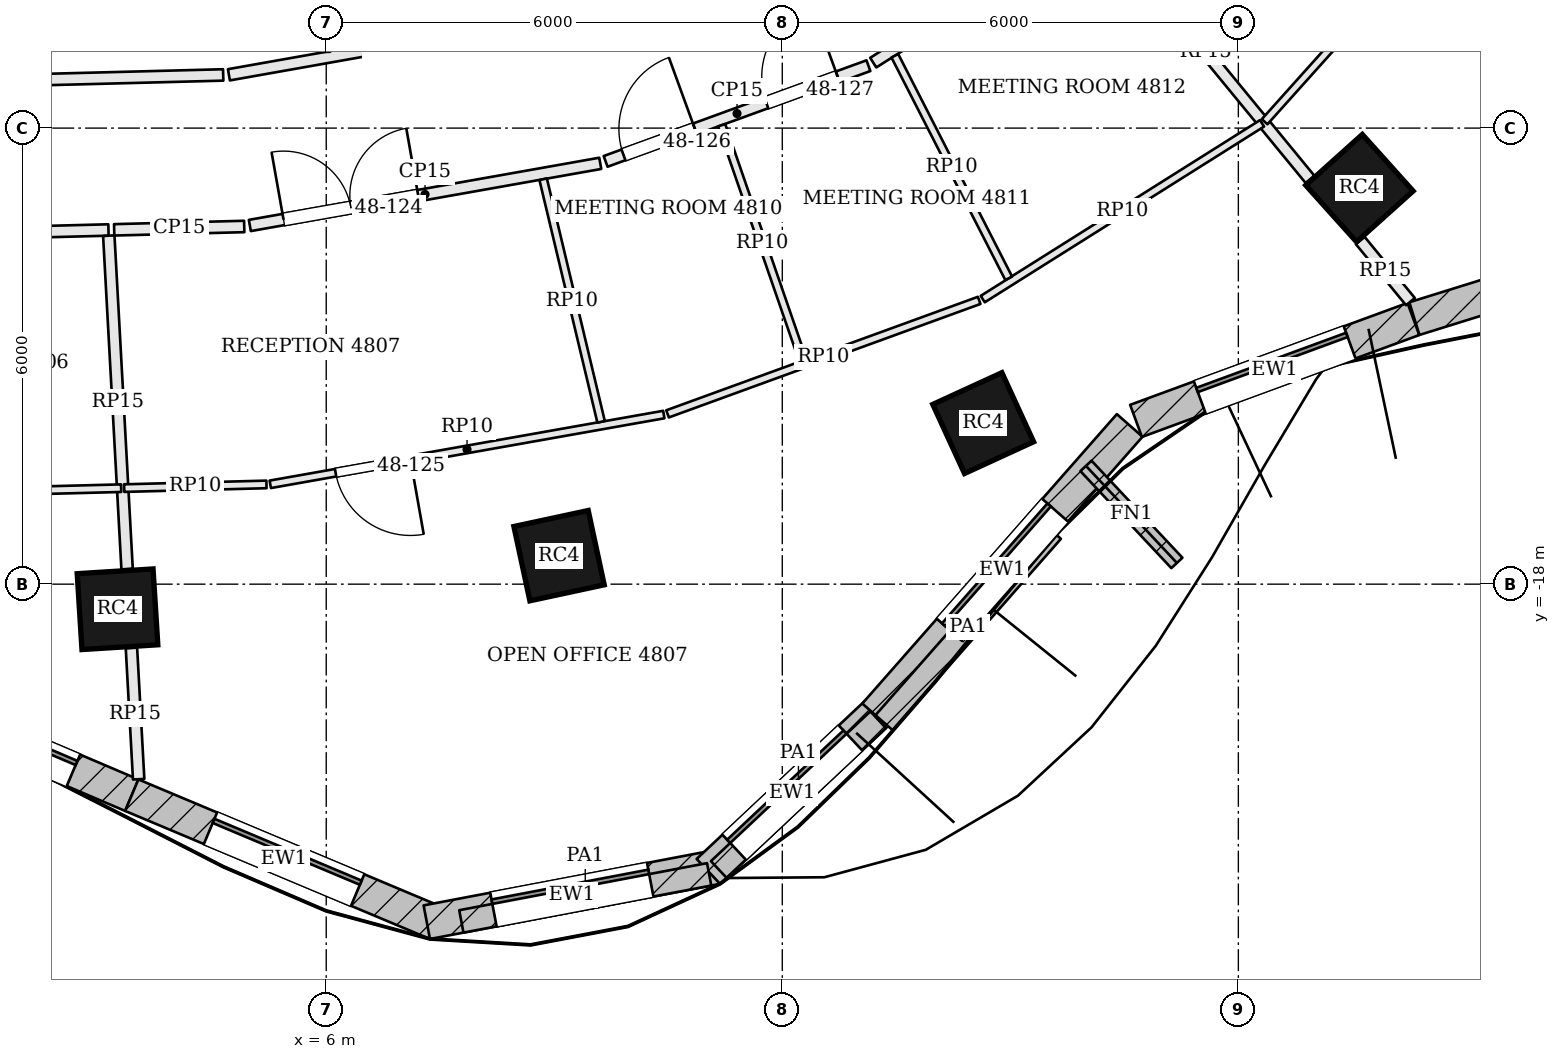
"""IFC4 building model, lengths in metres.
Left out: names, types, materials, properties, quantities, classifications, styles, units other than length and angle.
Written with IfcOpenShell. Run it as: python <this file> out.ifc"""

import sys

from ifc_helpers import new_model, si_unit, direction, frame, frame_2d, origin, origin_2d, place, context, subcontext, project, spatial, rectangle, extrude, element, fill, save


model = new_model("IFC4")
c1 = context("Model", 3, precision=1e-05, world=origin(), true_north=direction((0.0, 1.0)))
c2 = subcontext(c1, "Body", "Model", "MODEL_VIEW")
j1 = project(units=[si_unit("LENGTHUNIT", "METRE"), si_unit("PLANEANGLEUNIT", "RADIAN")], contexts=[c1])
p1 = place(None, origin())
s1 = spatial("IfcSite", under=j1, at=p1, CompositionType="ELEMENT")
p2 = place(p1, origin())
s2 = spatial("IfcBuilding", under=s1, at=p2, CompositionType="ELEMENT")
p3 = place(p2, frame((0.0, 0.0, 197.4)))
s3 = spatial("IfcBuildingStorey", under=s2, at=p3, CompositionType="ELEMENT", Elevation=197.4)
for number, where, z_axis, x_axis in (
    (1, (3.254, -18.33, 0.0), (0.0, 0.0, 1.0), (0.998, 0.063, 0.0)),
    (2, (9.063, -17.625, 0.0), (0.0, 0.0, 1.0), (0.978, 0.21, 0.0)),
    (3, (14.643, -15.881, 0.0), (0.0, 0.0, 1.0), (0.909, 0.417, 0.0)),
    (4, (19.593, -12.79, 0.0), (0.0, 0.0, 1.0), (0.744, 0.668, 0.0)),
):
    element("IfcColumn", number, at=place(p3, frame(where, z_axis=z_axis, x_axis=x_axis)), inside=s3, PredefinedType="COLUMN", context=c2, shape_type="SweptSolid", body=[
        extrude(rectangle(XDim=1.0, YDim=1.0, at=origin_2d()), origin(), (0.0, 0.0, 1.0), 3.9),
    ])
p4 = place(p3, frame((-0.026, -19.299, 0.0), z_axis=(0.0, 0.0, 1.0), x_axis=(0.920040408927, -0.391823488245, 0.0)))
e5 = element("IfcWall", 5, at=p4, inside=s3, PredefinedType="SOLIDWALL", context=c2, shape_type="SweptSolid", body=[
    extrude(rectangle(XDim=3.77, YDim=0.45, at=frame_2d((1.885, 0.0))), origin(), (0.0, 0.0, 1.0), 3.7),
])
p5 = place(p4, frame((0.835, 0.0, 0.9)))
e6 = element("IfcOpeningElement", 6, at=p5, cuts=e5, PredefinedType="OPENING", context=c2, shape_type="SweptSolid", body=[
    extrude(rectangle(XDim=2.1, YDim=2.3, at=frame_2d((1.05, 1.15))), frame((0.0, 0.235, 0.0), z_axis=(0.0, -1.0, 0.0), x_axis=(1.0, 0.0, 0.0)), (0.0, 0.0, 1.0), 0.47),
])
p6 = place(p3, frame((3.441, -20.776, 0.0), z_axis=(0.0, 0.0, 1.0), x_axis=(0.921988121387, -0.387218160758, 0.0)))
e7 = element("IfcWall", 7, at=p6, inside=s3, PredefinedType="SOLIDWALL", context=c2, shape_type="SweptSolid", body=[
    extrude(rectangle(XDim=4.347, YDim=0.45, at=frame_2d((2.173, 0.0))), origin(), (0.0, 0.0, 1.0), 3.7),
])
p7 = place(p6, frame((1.123, 0.0, 0.9)))
e8 = element("IfcOpeningElement", 8, at=p7, cuts=e7, PredefinedType="OPENING", context=c2, shape_type="SweptSolid", body=[
    extrude(rectangle(XDim=2.1, YDim=2.3, at=frame_2d((1.05, 1.15))), frame((0.0, 0.235, 0.0), z_axis=(0.0, -1.0, 0.0), x_axis=(1.0, 0.0, 0.0)), (0.0, 0.0, 1.0), 0.47),
])
p8 = place(p3, frame((7.323, -22.447, 0.0), z_axis=(0.0, 0.0, 1.0), x_axis=(0.982420993638, 0.18667884524, 0.0)))
e9 = element("IfcWall", 9, at=p8, inside=s3, PredefinedType="SOLIDWALL", context=c2, shape_type="SweptSolid", body=[
    extrude(rectangle(XDim=3.884, YDim=0.45, at=frame_2d((1.942, 0.0))), origin(), (0.0, 0.0, 1.0), 3.7),
])
p9 = place(p8, frame((0.892, 0.0, 0.9)))
e10 = element("IfcOpeningElement", 10, at=p9, cuts=e9, PredefinedType="OPENING", context=c2, shape_type="SweptSolid", body=[
    extrude(rectangle(XDim=2.1, YDim=2.3, at=frame_2d((1.05, 1.15))), frame((0.0, 0.235, 0.0), z_axis=(0.0, -1.0, 0.0), x_axis=(1.0, 0.0, 0.0)), (0.0, 0.0, 1.0), 0.47),
])
p10 = place(p3, frame((11.027, -21.779, 0.0), z_axis=(0.0, 0.0, 1.0), x_axis=(0.728871214251, 0.684650825631, 0.0)))
e11 = element("IfcWall", 11, at=p10, inside=s3, PredefinedType="SOLIDWALL", context=c2, shape_type="SweptSolid", body=[
    extrude(rectangle(XDim=3.031, YDim=0.45, at=frame_2d((1.516, 0.0))), origin(), (0.0, 0.0, 1.0), 3.7),
])
p11 = place(p10, frame((0.466, 0.0, 0.9)))
e12 = element("IfcOpeningElement", 12, at=p11, cuts=e11, PredefinedType="OPENING", context=c2, shape_type="SweptSolid", body=[
    extrude(rectangle(XDim=2.1, YDim=2.3, at=frame_2d((1.05, 1.15))), frame((0.0, 0.235, 0.0), z_axis=(0.0, -1.0, 0.0), x_axis=(1.0, 0.0, 0.0)), (0.0, 0.0, 1.0), 0.47),
])
p12 = place(p3, frame((13.221, -19.719, 0.0), z_axis=(0.0, 0.0, 1.0), x_axis=(0.660424908916, 0.750892095899, 0.0)))
e13 = element("IfcWall", 13, at=p12, inside=s3, PredefinedType="SOLIDWALL", context=c2, shape_type="SweptSolid", body=[
    extrude(rectangle(XDim=5.071, YDim=0.45, at=frame_2d((2.535, 0.0))), origin(), (0.0, 0.0, 1.0), 3.7),
])
p13 = place(p12, frame((1.485, 0.0, 0.9)))
e14 = element("IfcOpeningElement", 14, at=p13, cuts=e13, PredefinedType="OPENING", context=c2, shape_type="SweptSolid", body=[
    extrude(rectangle(XDim=2.1, YDim=2.3, at=frame_2d((1.05, 1.15))), frame((0.0, 0.235, 0.0), z_axis=(0.0, -1.0, 0.0), x_axis=(1.0, 0.0, 0.0)), (0.0, 0.0, 1.0), 0.47),
])
p14 = place(p3, frame((16.654, -15.852, 0.0), z_axis=(0.0, 0.0, 1.0), x_axis=(0.938636568132, 0.344907803572, 0.0)))
e15 = element("IfcWall", 15, at=p14, inside=s3, PredefinedType="SOLIDWALL", context=c2, shape_type="SweptSolid", body=[
    extrude(rectangle(XDim=3.887, YDim=0.45, at=frame_2d((1.944, 0.0))), origin(), (0.0, 0.0, 1.0), 3.7),
])
p15 = place(p14, frame((0.894, 0.0, 0.9)))
e16 = element("IfcOpeningElement", 16, at=p15, cuts=e15, PredefinedType="OPENING", context=c2, shape_type="SweptSolid", body=[
    extrude(rectangle(XDim=2.1, YDim=2.3, at=frame_2d((1.05, 1.15))), frame((0.0, 0.235, 0.0), z_axis=(0.0, -1.0, 0.0), x_axis=(1.0, 0.0, 0.0)), (0.0, 0.0, 1.0), 0.47),
])
p16 = place(p3, frame((20.316, -14.507, 0.0), z_axis=(0.0, 0.0, 1.0), x_axis=(0.954807195185, 0.297225873743, 0.0)))
e17 = element("IfcWall", 17, at=p16, inside=s3, PredefinedType="SOLIDWALL", context=c2, shape_type="SweptSolid", body=[
    extrude(rectangle(XDim=5.526, YDim=0.45, at=frame_2d((2.763, 0.0))), origin(), (0.0, 0.0, 1.0), 3.7),
])
p17 = place(p16, frame((1.713, 0.0, 0.9)))
e18 = element("IfcOpeningElement", 18, at=p17, cuts=e17, PredefinedType="OPENING", context=c2, shape_type="SweptSolid", body=[
    extrude(rectangle(XDim=2.1, YDim=2.3, at=frame_2d((1.05, 1.15))), frame((0.0, 0.235, 0.0), z_axis=(0.0, -1.0, 0.0), x_axis=(1.0, 0.0, 0.0)), (0.0, 0.0, 1.0), 0.47),
])
p18 = place(p3, frame((15.995, -16.444, 0.0), z_axis=(0.0, 0.0, 1.0), x_axis=(0.683852936488, -0.729619874494, 0.0)))
e19 = element("IfcWall", 19, at=p18, inside=s3, PredefinedType="SOLIDWALL", context=c2, shape_type="SweptSolid", body=[
    extrude(rectangle(XDim=1.75, YDim=0.2, at=frame_2d((0.875, 0.0))), origin(), (0.0, 0.0, 1.0), 3.7),
])
p19 = place(p3, frame((7.778, -22.437, 3.9), z_axis=(0.0, 0.0, 1.0), x_axis=(0.98241446716, 0.186713188382, 0.0)))
e20 = element("IfcWall", 20, at=p19, inside=s3, PredefinedType="PARAPET", context=c2, shape_type="SweptSolid", body=[
    extrude(rectangle(XDim=3.319, YDim=0.3, at=frame_2d((1.659, 0.0))), origin(), (0.0, 0.0, 1.0), 1.1),
])
p20 = place(p3, frame((11.164, -21.753, 3.9), z_axis=(0.0, 0.0, 1.0), x_axis=(0.72886475222, 0.684657704967, 0.0)))
e21 = element("IfcWall", 21, at=p20, inside=s3, PredefinedType="PARAPET", context=c2, shape_type="SweptSolid", body=[
    extrude(rectangle(XDim=2.877, YDim=0.3, at=frame_2d((1.438, 0.0))), origin(), (0.0, 0.0, 1.0), 1.1),
])
p21 = place(p3, frame((13.339, -19.822, 3.9), z_axis=(0.0, 0.0, 1.0), x_axis=(0.660445690116, 0.7508738179, 0.0)))
e22 = element("IfcWall", 22, at=p21, inside=s3, PredefinedType="PARAPET", context=c2, shape_type="SweptSolid", body=[
    extrude(rectangle(XDim=3.353, YDim=0.3, at=frame_2d((1.677, 0.0))), origin(), (0.0, 0.0, 1.0), 1.1),
])
p22 = place(p3, frame((-1.951, -13.472, 0.0), z_axis=(0.0, 0.0, 1.0), x_axis=(0.999664235233, 0.025911711565, 0.0)))
e23 = element("IfcWall", 23, at=p22, inside=s3, PredefinedType="PARTITIONING", context=c2, shape_type="SweptSolid", body=[
    extrude(rectangle(XDim=5.088, YDim=0.15, at=frame_2d((2.544, 0.0))), origin(), (0.0, 0.0, 1.0), 3.084),
])
p23 = place(p3, frame((3.532, -20.566, 0.0), z_axis=(0.0, 0.0, 1.0), x_axis=(-0.054930375168, 0.998490187175, 0.0)))
e24 = element("IfcWall", 24, at=p23, inside=s3, PredefinedType="PARTITIONING", context=c2, shape_type="SweptSolid", body=[
    extrude(rectangle(XDim=1.729, YDim=0.15, at=frame_2d((0.865, 0.0))), origin(), (0.0, 0.0, 1.0), 3.084),
])
p24 = place(p3, frame((3.38, -17.801, 0.0), z_axis=(0.0, 0.0, 1.0), x_axis=(-0.054860476936, 0.998494030062, 0.0)))
e25 = element("IfcWall", 25, at=p24, inside=s3, PredefinedType="PARTITIONING", context=c2, shape_type="SweptSolid", body=[
    extrude(rectangle(XDim=4.392, YDim=0.15, at=frame_2d((2.196, 0.0))), origin(), (0.0, 0.0, 1.0), 3.084),
])
p25 = place(p3, frame((3.21, -13.339, 0.0), z_axis=(0.0, 0.0, 1.0), x_axis=(0.999662941738, 0.025961566124, 0.0)))
e26 = element("IfcWall", 26, at=p25, inside=s3, PredefinedType="PARTITIONING", context=c2, shape_type="SweptSolid", body=[
    extrude(rectangle(XDim=1.711, YDim=0.15, at=frame_2d((0.856, 0.0))), origin(), (0.0, 0.0, 1.0), 3.084),
])
p26 = place(p3, frame((4.995, -13.281, 0.0), z_axis=(0.0, 0.0, 1.0), x_axis=(0.98463411377, 0.174630071865, 0.0)))
e27 = element("IfcWall", 27, at=p26, inside=s3, PredefinedType="PARTITIONING", context=c2, shape_type="SweptSolid", body=[
    extrude(rectangle(XDim=4.682, YDim=0.15, at=frame_2d((2.341, 0.0))), origin(), (0.0, 0.0, 1.0), 3.084),
])
p27 = place(p26, frame((0.45, 0.0, 0.0)))
e28 = element("IfcOpeningElement", 28, at=p27, cuts=e27, PredefinedType="OPENING", context=c2, shape_type="SweptSolid", body=[
    extrude(rectangle(XDim=1.8, YDim=2.1, at=frame_2d((0.9, 1.05))), frame((0.0, 0.085, 0.0), z_axis=(0.0, -1.0, 0.0), x_axis=(1.0, 0.0, 0.0)), (0.0, 0.0, 1.0), 0.17),
])
p28 = place(p3, frame((9.676, -12.438, 0.0), z_axis=(0.0, 0.0, 1.0), x_axis=(0.939640289748, 0.342163887461, 0.0)))
e29 = element("IfcWall", 29, at=p28, inside=s3, PredefinedType="PARTITIONING", context=c2, shape_type="SweptSolid", body=[
    extrude(rectangle(XDim=3.68, YDim=0.15, at=frame_2d((1.84, 0.0))), origin(), (0.0, 0.0, 1.0), 3.084),
])
p29 = place(p28, frame((0.25, 0.0, 0.0)))
e30 = element("IfcOpeningElement", 30, at=p29, cuts=e29, PredefinedType="OPENING", context=c2, shape_type="SweptSolid", body=[
    extrude(rectangle(XDim=1.0, YDim=2.4, at=frame_2d((0.5, 1.2))), frame((0.0, 0.085, 0.0), z_axis=(0.0, -1.0, 0.0), x_axis=(1.0, 0.0, 0.0)), (0.0, 0.0, 1.0), 0.17),
])
p30 = place(p28, frame((2.25, 0.0, 0.0)))
e31 = element("IfcOpeningElement", 31, at=p30, cuts=e29, PredefinedType="OPENING", context=c2, shape_type="SweptSolid", body=[
    extrude(rectangle(XDim=1.0, YDim=2.4, at=frame_2d((0.5, 1.2))), frame((0.0, 0.085, 0.0), z_axis=(0.0, -1.0, 0.0), x_axis=(1.0, 0.0, 0.0)), (0.0, 0.0, 1.0), 0.17),
])
p31 = place(p3, frame((13.197, -11.139, 0.0), z_axis=(0.0, 0.0, 1.0), x_axis=(0.845847451173, 0.533424867572, 0.0)))
e32 = element("IfcWall", 32, at=p31, inside=s3, PredefinedType="PARTITIONING", context=c2, shape_type="SweptSolid", body=[
    extrude(rectangle(XDim=3.493, YDim=0.15, at=frame_2d((1.747, 0.0))), origin(), (0.0, 0.0, 1.0), 3.084),
])
p32 = place(p31, frame((1.394, 0.0, 0.0)))
e33 = element("IfcOpeningElement", 33, at=p32, cuts=e32, PredefinedType="OPENING", context=c2, shape_type="SweptSolid", body=[
    extrude(rectangle(XDim=1.0, YDim=2.4, at=frame_2d((0.5, 1.2))), frame((0.0, 0.085, 0.0), z_axis=(0.0, -1.0, 0.0), x_axis=(1.0, 0.0, 0.0)), (0.0, 0.0, 1.0), 0.17),
])
p33 = place(p3, frame((20.264, -14.283, 0.0), z_axis=(0.0, 0.0, 1.0), x_axis=(-0.634834544887, 0.77264810918, 0.0)))
e34 = element("IfcWall", 34, at=p33, inside=s3, PredefinedType="PARTITIONING", context=c2, shape_type="SweptSolid", body=[
    extrude(rectangle(XDim=1.04, YDim=0.15, at=frame_2d((0.52, 0.0))), origin(), (0.0, 0.0, 1.0), 3.084),
])
p34 = place(p3, frame((18.943, -12.675, 0.0), z_axis=(0.0, 0.0, 1.0), x_axis=(-0.634730994321, 0.772733178301, 0.0)))
e35 = element("IfcWall", 35, at=p34, inside=s3, PredefinedType="PARTITIONING", context=c2, shape_type="SweptSolid", body=[
    extrude(rectangle(XDim=4.324, YDim=0.15, at=frame_2d((2.162, 0.0))), origin(), (0.0, 0.0, 1.0), 3.084),
])
p35 = place(p3, frame((9.01, -10.538, 0.0), z_axis=(0.0, 0.0, 1.0), x_axis=(-0.984645638575, -0.174565077936, 0.0)))
e36 = element("IfcWall", 36, at=p35, inside=s3, PredefinedType="PARTITIONING", context=c2, shape_type="SweptSolid", body=[
    extrude(rectangle(XDim=4.358, YDim=0.15, at=frame_2d((2.179, 0.0))), origin(), (0.0, 0.0, 1.0), 3.084),
])
p36 = place(p3, frame((4.645, -11.301, 0.0), z_axis=(0.0, 0.0, 1.0), x_axis=(-0.9996648469, -0.02588810291, 0.0)))
e37 = element("IfcWall", 37, at=p36, inside=s3, PredefinedType="PARTITIONING", context=c2, shape_type="SweptSolid", body=[
    extrude(rectangle(XDim=6.611, YDim=0.15, at=frame_2d((3.305, 0.0))), origin(), (0.0, 0.0, 1.0), 3.084),
])
p37 = place(p3, frame((3.302, -16.737, 0.0), z_axis=(0.0, 0.0, 1.0), x_axis=(-0.999665233763, -0.025873159948, 0.0)))
e38 = element("IfcWall", 38, at=p37, inside=s3, PredefinedType="PARTITIONING", context=c2, shape_type="SweptSolid", body=[
    extrude(rectangle(XDim=5.435, YDim=0.1, at=frame_2d((2.718, 0.0))), origin(), (0.0, 0.0, 1.0), 3.084),
])
p38 = place(p37, frame((1.454, 0.0, 0.0)))
e39 = element("IfcOpeningElement", 39, at=p38, cuts=e38, PredefinedType="OPENING", context=c2, shape_type="SweptSolid", body=[
    extrude(rectangle(XDim=0.9, YDim=2.1, at=frame_2d((0.45, 1.05))), frame((0.0, 0.06, 0.0), z_axis=(0.0, -1.0, 0.0), x_axis=(1.0, 0.0, 0.0)), (0.0, 0.0, 1.0), 0.12),
])
p39 = place(p3, frame((18.312, -11.938, 0.0), z_axis=(0.0, 0.0, 1.0), x_axis=(-0.846383069278, -0.532574595752, 0.0)))
e40 = element("IfcWall", 40, at=p39, inside=s3, PredefinedType="PARTITIONING", context=c2, shape_type="SweptSolid", body=[
    extrude(rectangle(XDim=4.341, YDim=0.1, at=frame_2d((2.171, 0.0))), origin(), (0.0, 0.0, 1.0), 3.084),
])
p40 = place(p3, frame((14.59, -14.267, 0.0), z_axis=(0.0, 0.0, 1.0), x_axis=(-0.939623405418, -0.342210251148, 0.0)))
e41 = element("IfcWall", 41, at=p40, inside=s3, PredefinedType="PARTITIONING", context=c2, shape_type="SweptSolid", body=[
    extrude(rectangle(XDim=4.363, YDim=0.1, at=frame_2d((2.182, 0.0))), origin(), (0.0, 0.0, 1.0), 3.084),
])
p41 = place(p3, frame((10.441, -15.769, 0.0), z_axis=(0.0, 0.0, 1.0), x_axis=(-0.984642067447, -0.174585219919, 0.0)))
e42 = element("IfcWall", 42, at=p41, inside=s3, PredefinedType="PARTITIONING", context=c2, shape_type="SweptSolid", body=[
    extrude(rectangle(XDim=5.258, YDim=0.1, at=frame_2d((2.629, 0.0))), origin(), (0.0, 0.0, 1.0), 3.084),
])
p42 = place(p41, frame((3.385, 0.0, 0.0)))
e43 = element("IfcOpeningElement", 43, at=p42, cuts=e42, PredefinedType="OPENING", context=c2, shape_type="SweptSolid", body=[
    extrude(rectangle(XDim=1.0, YDim=2.1, at=frame_2d((0.5, 1.05))), frame((0.0, 0.06, 0.0), z_axis=(0.0, -1.0, 0.0), x_axis=(1.0, 0.0, 0.0)), (0.0, 0.0, 1.0), 0.12),
])
p43 = place(p3, frame((5.214, -16.688, 0.0), z_axis=(0.0, 0.0, 1.0), x_axis=(-0.99966341664, -0.025943273332, 0.0)))
e44 = element("IfcWall", 44, at=p43, inside=s3, PredefinedType="PARTITIONING", context=c2, shape_type="SweptSolid", body=[
    extrude(rectangle(XDim=1.873, YDim=0.1, at=frame_2d((0.937, 0.0))), origin(), (0.0, 0.0, 1.0), 3.084),
])
p44 = place(p3, frame((8.854, -12.673, 0.0), z_axis=(0.0, 0.0, 1.0), x_axis=(0.23231460878, -0.972640695502, 0.0)))
e45 = element("IfcWall", 45, at=p44, inside=s3, PredefinedType="PARTITIONING", context=c2, shape_type="SweptSolid", body=[
    extrude(rectangle(XDim=3.281, YDim=0.1, at=frame_2d((1.641, 0.0))), origin(), (0.0, 0.0, 1.0), 3.084),
])
p45 = place(p3, frame((11.201, -11.962, 0.0), z_axis=(0.0, 0.0, 1.0), x_axis=(0.32685198031, -0.945075543524, 0.0)))
e46 = element("IfcWall", 46, at=p45, inside=s3, PredefinedType="PARTITIONING", context=c2, shape_type="SweptSolid", body=[
    extrude(rectangle(XDim=3.275, YDim=0.1, at=frame_2d((1.638, 0.0))), origin(), (0.0, 0.0, 1.0), 3.084),
])
p46 = place(p3, frame((13.481, -11.048, 0.0), z_axis=(0.0, 0.0, 1.0), x_axis=(0.455538746767, -0.890215957054, 0.0)))
e47 = element("IfcWall", 47, at=p46, inside=s3, PredefinedType="PARTITIONING", context=c2, shape_type="SweptSolid", body=[
    extrude(rectangle(XDim=3.289, YDim=0.1, at=frame_2d((1.644, 0.0))), origin(), (0.0, 0.0, 1.0), 3.084),
])
p47 = place(p3, frame((21.149, -8.789, 0.0), z_axis=(0.0, 0.0, 1.0), x_axis=(-0.667605024822, -0.744515635049, 0.0)))
e48 = element("IfcWall", 48, at=p47, inside=s3, PredefinedType="PARTITIONING", context=c2, shape_type="SweptSolid", body=[
    extrude(rectangle(XDim=4.2, YDim=0.1, at=frame_2d((2.1, 0.0))), origin(), (0.0, 0.0, 1.0), 3.084),
])
p48 = place(p47, frame((0.733, 0.0, 0.0)))
e49 = element("IfcOpeningElement", 49, at=p48, cuts=e48, PredefinedType="OPENING", context=c2, shape_type="SweptSolid", body=[
    extrude(rectangle(XDim=1.0, YDim=2.1, at=frame_2d((0.5, 1.05))), frame((0.0, 0.06, 0.0), z_axis=(0.0, -1.0, 0.0), x_axis=(1.0, 0.0, 0.0)), (0.0, 0.0, 1.0), 0.12),
])
p49 = place(p5, origin())
e50 = element("IfcWindow", 50, at=p49, inside=s3, PartitioningType="SINGLE_PANEL", PredefinedType="WINDOW", context=c2, shape_type="SweptSolid", body=[
    extrude(rectangle(XDim=2.1, YDim=2.3, at=frame_2d((1.05, 1.15))), frame((0.0, 0.135, 0.0), z_axis=(0.0, -1.0, 0.0), x_axis=(1.0, 0.0, 0.0)), (0.0, 0.0, 1.0), 0.06),
])
fill(e6, e50)
p50 = place(p7, origin())
e51 = element("IfcWindow", 51, at=p50, inside=s3, PartitioningType="SINGLE_PANEL", PredefinedType="WINDOW", context=c2, shape_type="SweptSolid", body=[
    extrude(rectangle(XDim=2.1, YDim=2.3, at=frame_2d((1.05, 1.15))), frame((0.0, 0.135, 0.0), z_axis=(0.0, -1.0, 0.0), x_axis=(1.0, 0.0, 0.0)), (0.0, 0.0, 1.0), 0.06),
])
fill(e8, e51)
p51 = place(p9, origin())
e52 = element("IfcWindow", 52, at=p51, inside=s3, PartitioningType="SINGLE_PANEL", PredefinedType="WINDOW", context=c2, shape_type="SweptSolid", body=[
    extrude(rectangle(XDim=2.1, YDim=2.3, at=frame_2d((1.05, 1.15))), frame((0.0, 0.135, 0.0), z_axis=(0.0, -1.0, 0.0), x_axis=(1.0, 0.0, 0.0)), (0.0, 0.0, 1.0), 0.06),
])
fill(e10, e52)
p52 = place(p11, origin())
e53 = element("IfcWindow", 53, at=p52, inside=s3, PartitioningType="SINGLE_PANEL", PredefinedType="WINDOW", context=c2, shape_type="SweptSolid", body=[
    extrude(rectangle(XDim=2.1, YDim=2.3, at=frame_2d((1.05, 1.15))), frame((0.0, 0.135, 0.0), z_axis=(0.0, -1.0, 0.0), x_axis=(1.0, 0.0, 0.0)), (0.0, 0.0, 1.0), 0.06),
])
fill(e12, e53)
p53 = place(p13, origin())
e54 = element("IfcWindow", 54, at=p53, inside=s3, PartitioningType="SINGLE_PANEL", PredefinedType="WINDOW", context=c2, shape_type="SweptSolid", body=[
    extrude(rectangle(XDim=2.1, YDim=2.3, at=frame_2d((1.05, 1.15))), frame((0.0, 0.135, 0.0), z_axis=(0.0, -1.0, 0.0), x_axis=(1.0, 0.0, 0.0)), (0.0, 0.0, 1.0), 0.06),
])
fill(e14, e54)
p54 = place(p15, origin())
e55 = element("IfcWindow", 55, at=p54, inside=s3, PartitioningType="SINGLE_PANEL", PredefinedType="WINDOW", context=c2, shape_type="SweptSolid", body=[
    extrude(rectangle(XDim=2.1, YDim=2.3, at=frame_2d((1.05, 1.15))), frame((0.0, 0.135, 0.0), z_axis=(0.0, -1.0, 0.0), x_axis=(1.0, 0.0, 0.0)), (0.0, 0.0, 1.0), 0.06),
])
fill(e16, e55)
p55 = place(p27, origin())
e56 = element("IfcDoor", 56, at=p55, inside=s3, OperationType="DOUBLE_DOOR_SINGLE_SWING", PredefinedType="DOOR", context=c2, shape_type="SweptSolid", body=[
    extrude(rectangle(XDim=1.8, YDim=2.1, at=frame_2d((0.9, 1.05))), frame((0.0, 0.025, 0.0), z_axis=(0.0, -1.0, 0.0), x_axis=(1.0, 0.0, 0.0)), (0.0, 0.0, 1.0), 0.05),
])
fill(e28, e56)
p56 = place(p42, origin())
e57 = element("IfcDoor", 57, at=p56, inside=s3, OperationType="SINGLE_SWING_LEFT", PredefinedType="DOOR", context=c2, shape_type="SweptSolid", body=[
    extrude(rectangle(XDim=1.0, YDim=2.1, at=frame_2d((0.5, 1.05))), frame((0.0, 0.025, 0.0), z_axis=(0.0, -1.0, 0.0), x_axis=(1.0, 0.0, 0.0)), (0.0, 0.0, 1.0), 0.05),
])
fill(e43, e57)
p57 = place(p29, origin())
e58 = element("IfcDoor", 58, at=p57, inside=s3, OperationType="SINGLE_SWING_RIGHT", PredefinedType="DOOR", context=c2, shape_type="SweptSolid", body=[
    extrude(rectangle(XDim=1.0, YDim=2.4, at=frame_2d((0.5, 1.2))), frame((0.0, 0.025, 0.0), z_axis=(0.0, -1.0, 0.0), x_axis=(1.0, 0.0, 0.0)), (0.0, 0.0, 1.0), 0.05),
])
fill(e30, e58)
p58 = place(p30, origin())
e59 = element("IfcDoor", 59, at=p58, inside=s3, OperationType="SINGLE_SWING_RIGHT", PredefinedType="DOOR", context=c2, shape_type="SweptSolid", body=[
    extrude(rectangle(XDim=1.0, YDim=2.4, at=frame_2d((0.5, 1.2))), frame((0.0, 0.025, 0.0), z_axis=(0.0, -1.0, 0.0), x_axis=(1.0, 0.0, 0.0)), (0.0, 0.0, 1.0), 0.05),
])
fill(e31, e59)
save(model, sys.argv[1])
